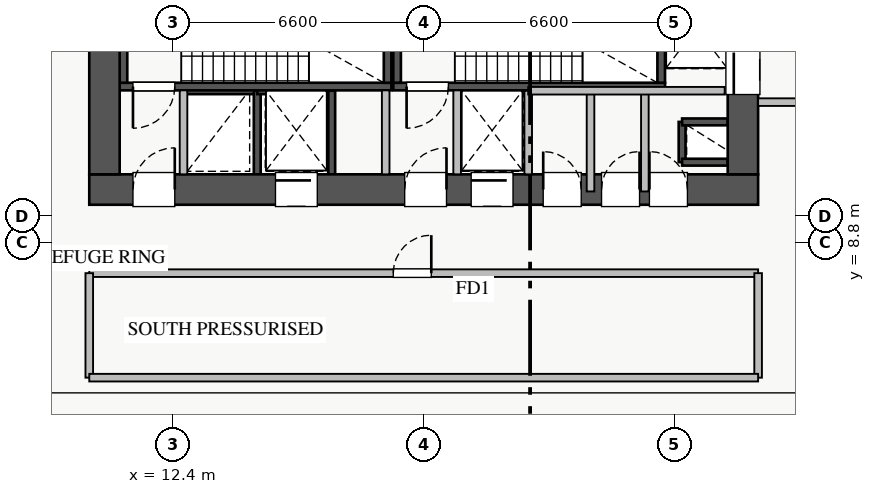
"""IFC4 building model, lengths in metres.
Left out: names, types, materials, properties, quantities, classifications, styles, units other than length and angle.
Written with IfcOpenShell. Run it as: python <this file> out.ifc"""

import sys

from ifc_helpers import new_model, si_unit, direction, frame, frame_2d, origin, place, context, subcontext, project, spatial, rectangle, extrude, source, transform, mapped, element, fill, save


model = new_model("IFC4")
c1 = context("Model", 3, precision=1e-05, world=origin(), true_north=direction((0.0, 1.0)))
c2 = subcontext(c1, "Body", "Model", "MODEL_VIEW")
j1 = project(units=[si_unit("LENGTHUNIT", "METRE"), si_unit("PLANEANGLEUNIT", "RADIAN")], contexts=[c1])
p1 = place(None, origin())
s1 = spatial("IfcSite", under=j1, at=p1, CompositionType="ELEMENT")
p2 = place(p1, origin())
s2 = spatial("IfcBuilding", under=s1, at=p2, CompositionType="ELEMENT")
p3 = place(p2, frame((0.0, 0.0, 45.75)))
s3 = spatial("IfcBuildingStorey", under=s2, at=p3, CompositionType="ELEMENT", Elevation=45.75)
p4 = place(p3, frame((12.68, 12.8, 0.0), z_axis=(0.0, 0.0, 1.0), x_axis=(1.0, 0.0, 0.0)))
e1 = element("IfcWall", 1, at=p4, inside=s3, PredefinedType="SHEAR", context=c2, shape_type="SweptSolid", body=[
    extrude(rectangle(XDim=1.94, YDim=0.18, at=frame_2d((0.97, 0.0))), origin(), (0.0, 0.0, 1.0), 4.32),
])
p5 = place(p3, frame((14.62, 10.6, 0.0), z_axis=(0.0, 0.0, 1.0), x_axis=(0.0, 1.0, 0.0)))
e2 = element("IfcWall", 2, at=p5, inside=s3, PredefinedType="SHEAR", context=c2, shape_type="SweptSolid", body=[
    extrude(rectangle(XDim=2.2, YDim=0.18, at=frame_2d((1.1, 0.0))), origin(), (0.0, 0.0, 1.0), 4.32),
])
p6 = place(p3, frame((25.8, 10.92, 0.0), z_axis=(0.0, 0.0, 1.0), x_axis=(0.0, 1.0, 0.0)))
e3 = element("IfcWall", 3, at=p6, inside=s3, PredefinedType="SHEAR", context=c2, shape_type="SweptSolid", body=[
    extrude(rectangle(XDim=1.06, YDim=0.18, at=frame_2d((0.53, 0.0))), origin(), (0.0, 0.0, 1.0), 4.32),
])
for number, where, z_axis, x_axis in (
    (4, (25.8, 11.98, 0.0), (0.0, 0.0, 1.0), (1.0, 0.0, 0.0)),
    (5, (25.8, 10.92, 0.0), (0.0, 0.0, 1.0), (1.0, 0.0, 0.0)),
):
    element("IfcWall", number, at=place(p3, frame(where, z_axis=z_axis, x_axis=x_axis)), inside=s3, PredefinedType="SHEAR", context=c2, shape_type="SweptSolid", body=[
        extrude(rectangle(XDim=1.2, YDim=0.18, at=frame_2d((0.6, 0.0))), origin(), (0.0, 0.0, 1.0), 4.32),
    ])
p7 = place(p3, frame((14.62, 12.8, 0.0), z_axis=(0.0, 0.0, 1.0), x_axis=(1.0, 0.0, 0.0)))
e6 = element("IfcWall", 6, at=p7, inside=s3, PredefinedType="SHEAR", context=c2, shape_type="SweptSolid", body=[
    extrude(rectangle(XDim=1.96, YDim=0.18, at=frame_2d((0.98, 0.0))), origin(), (0.0, 0.0, 1.0), 4.32),
])
p8 = place(p3, frame((16.58, 10.6, 0.0), z_axis=(0.0, 0.0, 1.0), x_axis=(0.0, 1.0, 0.0)))
e7 = element("IfcWall", 7, at=p8, inside=s3, PredefinedType="SHEAR", context=c2, shape_type="SweptSolid", body=[
    extrude(rectangle(XDim=2.2, YDim=0.18, at=frame_2d((1.1, 0.0))), origin(), (0.0, 0.0, 1.0), 4.32),
])
p9 = place(p3, frame((19.88, 12.8, 0.0), z_axis=(0.0, 0.0, 1.0), x_axis=(1.0, 0.0, 0.0)))
e8 = element("IfcWall", 8, at=p9, inside=s3, PredefinedType="SHEAR", context=c2, shape_type="SweptSolid", body=[
    extrude(rectangle(XDim=1.87, YDim=0.18, at=frame_2d((0.935, 0.0))), origin(), (0.0, 0.0, 1.0), 4.32),
])
p10 = place(p3, frame((11.0, 12.91, 0.0), z_axis=(0.0, 0.0, 1.0), x_axis=(1.0, 0.0, 0.0)))
e9 = element("IfcWall", 9, at=p10, inside=s3, PredefinedType="SHEAR", context=c2, shape_type="SweptSolid", body=[
    extrude(rectangle(XDim=7.15, YDim=0.2, at=frame_2d((3.575, 0.0))), origin(), (0.0, 0.0, 1.0), 4.5),
])
p11 = place(p10, frame((0.35, 0.0, 0.0)))
e10 = element("IfcOpeningElement", 10, at=p11, cuts=e9, PredefinedType="OPENING", context=c2, shape_type="SweptSolid", body=[
    extrude(rectangle(XDim=1.1, YDim=2.05, at=frame_2d((0.55, 1.025))), frame((0.0, 0.11, 0.0), z_axis=(0.0, -1.0, 0.0), x_axis=(1.0, 0.0, 0.0)), (0.0, 0.0, 1.0), 0.22),
])
for number, where, z_axis, x_axis in (
    (11, (11.1, 13.01, 0.0), (0.0, 0.0, 1.0), (0.0, 1.0, 0.0)),
    (12, (18.05, 13.01, 0.0), (0.0, 0.0, 1.0), (0.0, 1.0, 0.0)),
):
    element("IfcWall", number, at=place(p3, frame(where, z_axis=z_axis, x_axis=x_axis)), inside=s3, PredefinedType="SHEAR", context=c2, shape_type="SweptSolid", body=[
        extrude(rectangle(XDim=2.94, YDim=0.2, at=frame_2d((1.47, 0.0))), origin(), (0.0, 0.0, 1.0), 4.5),
    ])
p12 = place(p3, frame((18.2, 12.91, 0.0), z_axis=(0.0, 0.0, 1.0), x_axis=(1.0, 0.0, 0.0)))
e13 = element("IfcWall", 13, at=p12, inside=s3, PredefinedType="SHEAR", context=c2, shape_type="SweptSolid", body=[
    extrude(rectangle(XDim=7.15, YDim=0.2, at=frame_2d((3.575, 0.0))), origin(), (0.0, 0.0, 1.0), 4.5),
])
p13 = place(p12, frame((0.35, 0.0, 0.0)))
e14 = element("IfcOpeningElement", 14, at=p13, cuts=e13, PredefinedType="OPENING", context=c2, shape_type="SweptSolid", body=[
    extrude(rectangle(XDim=1.1, YDim=2.05, at=frame_2d((0.55, 1.025))), frame((0.0, 0.11, 0.0), z_axis=(0.0, -1.0, 0.0), x_axis=(1.0, 0.0, 0.0)), (0.0, 0.0, 1.0), 0.22),
])
for number, where, z_axis, x_axis in (
    (15, (18.3, 13.01, 0.0), (0.0, 0.0, 1.0), (0.0, 1.0, 0.0)),
    (16, (25.25, 13.01, 0.0), (0.0, 0.0, 1.0), (0.0, 1.0, 0.0)),
):
    element("IfcWall", number, at=place(p3, frame(where, z_axis=z_axis, x_axis=x_axis)), inside=s3, PredefinedType="SHEAR", context=c2, shape_type="SweptSolid", body=[
        extrude(rectangle(XDim=2.94, YDim=0.2, at=frame_2d((1.47, 0.0))), origin(), (0.0, 0.0, 1.0), 4.5),
    ])
p14 = place(p3, frame((10.2, 10.2, 0.0), z_axis=(0.0, 0.0, 1.0), x_axis=(1.0, 0.0, 0.0)))
e17 = element("IfcWall", 17, at=p14, inside=s3, PredefinedType="SHEAR", context=c2, shape_type="SweptSolid", body=[
    extrude(rectangle(XDim=17.6, YDim=0.8, at=frame_2d((8.8, 0.0))), origin(), (0.0, 0.0, 1.0), 4.5),
])
p15 = place(p14, frame((1.15, 0.0, 0.0)))
e18 = element("IfcOpeningElement", 18, at=p15, cuts=e17, PredefinedType="OPENING", context=c2, shape_type="SweptSolid", body=[
    extrude(rectangle(XDim=1.1, YDim=2.05, at=frame_2d((0.55, 1.025))), frame((0.0, 0.41, 0.0), z_axis=(0.0, -1.0, 0.0), x_axis=(1.0, 0.0, 0.0)), (0.0, 0.0, 1.0), 0.82),
])
p16 = place(p14, frame((8.3, 0.0, 0.0)))
e19 = element("IfcOpeningElement", 19, at=p16, cuts=e17, PredefinedType="OPENING", context=c2, shape_type="SweptSolid", body=[
    extrude(rectangle(XDim=1.1, YDim=2.05, at=frame_2d((0.55, 1.025))), frame((0.0, 0.41, 0.0), z_axis=(0.0, -1.0, 0.0), x_axis=(1.0, 0.0, 0.0)), (0.0, 0.0, 1.0), 0.82),
])
p17 = place(p14, frame((10.05, 0.0, 0.0)))
e20 = element("IfcOpeningElement", 20, at=p17, cuts=e17, PredefinedType="OPENING", context=c2, shape_type="SweptSolid", body=[
    extrude(rectangle(XDim=1.1, YDim=2.05, at=frame_2d((0.55, 1.025))), frame((0.0, 0.41, 0.0), z_axis=(0.0, -1.0, 0.0), x_axis=(1.0, 0.0, 0.0)), (0.0, 0.0, 1.0), 0.82),
])
p18 = place(p14, frame((4.9, 0.0, 0.0)))
e21 = element("IfcOpeningElement", 21, at=p18, cuts=e17, PredefinedType="OPENING", context=c2, shape_type="SweptSolid", body=[
    extrude(rectangle(XDim=1.1, YDim=2.05, at=frame_2d((0.55, 1.025))), frame((0.0, 0.41, 0.0), z_axis=(0.0, -1.0, 0.0), x_axis=(1.0, 0.0, 0.0)), (0.0, 0.0, 1.0), 0.82),
])
p19 = place(p14, frame((14.74, 0.0, 0.0)))
e22 = element("IfcOpeningElement", 22, at=p19, cuts=e17, PredefinedType="OPENING", context=c2, shape_type="SweptSolid", body=[
    extrude(rectangle(XDim=1.0, YDim=2.05, at=frame_2d((0.5, 1.025))), frame((0.0, 0.41, 0.0), z_axis=(0.0, -1.0, 0.0), x_axis=(1.0, 0.0, 0.0)), (0.0, 0.0, 1.0), 0.82),
])
p20 = place(p14, frame((11.945, 0.0, 0.0)))
e23 = element("IfcOpeningElement", 23, at=p20, cuts=e17, PredefinedType="OPENING", context=c2, shape_type="SweptSolid", body=[
    extrude(rectangle(XDim=1.0, YDim=2.05, at=frame_2d((0.5, 1.025))), frame((0.0, 0.41, 0.0), z_axis=(0.0, -1.0, 0.0), x_axis=(1.0, 0.0, 0.0)), (0.0, 0.0, 1.0), 0.82),
])
p21 = place(p14, frame((13.48, 0.0, 0.0)))
e24 = element("IfcOpeningElement", 24, at=p21, cuts=e17, PredefinedType="OPENING", context=c2, shape_type="SweptSolid", body=[
    extrude(rectangle(XDim=1.0, YDim=2.05, at=frame_2d((0.5, 1.025))), frame((0.0, 0.41, 0.0), z_axis=(0.0, -1.0, 0.0), x_axis=(1.0, 0.0, 0.0)), (0.0, 0.0, 1.0), 0.82),
])
p22 = place(p3, frame((10.6, 10.6, 0.0), z_axis=(0.0, 0.0, 1.0), x_axis=(0.0, 1.0, 0.0)))
e25 = element("IfcWall", 25, at=p22, inside=s3, PredefinedType="SHEAR", context=c2, shape_type="SweptSolid", body=[
    extrude(rectangle(XDim=5.6, YDim=0.8, at=frame_2d((2.8, 0.0))), origin(), (0.0, 0.0, 1.0), 4.5),
])
p23 = place(p3, frame((27.4, 10.6, 0.0), z_axis=(0.0, 0.0, 1.0), x_axis=(0.0, 1.0, 0.0)))
e26 = element("IfcWall", 26, at=p23, inside=s3, PredefinedType="SHEAR", context=c2, shape_type="SweptSolid", body=[
    extrude(rectangle(XDim=5.6, YDim=0.8, at=frame_2d((2.8, 0.0))), origin(), (0.0, 0.0, 1.0), 4.5),
])
p24 = place(p23, frame((2.1, 0.0, 0.0)))
e27 = element("IfcOpeningElement", 27, at=p24, cuts=e26, PredefinedType="OPENING", context=c2, shape_type="SweptSolid", body=[
    extrude(rectangle(XDim=1.3, YDim=2.05, at=frame_2d((0.65, 1.025))), frame((0.0, 0.41, 0.0), z_axis=(0.0, -1.0, 0.0), x_axis=(1.0, 0.0, 0.0)), (0.0, 0.0, 1.0), 0.82),
])
p25 = place(p3, frame((27.8, 12.5, 0.0), z_axis=(0.0, 0.0, 1.0), x_axis=(1.0, 0.0, 0.0)))
e28 = element("IfcWall", 28, at=p25, inside=s3, PredefinedType="PARTITIONING", context=c2, shape_type="SweptSolid", body=[
    extrude(rectangle(XDim=3.1, YDim=0.2, at=frame_2d((1.55, 0.0))), origin(), (0.0, 0.0, 1.0), 4.32),
])
for number, where, z_axis, x_axis in (
    (29, (12.68, 10.6, 0.0), (0.0, 0.0, 1.0), (0.0, 1.0, 0.0)),
    (30, (18.0, 10.6, 0.0), (0.0, 0.0, 1.0), (0.0, 1.0, 0.0)),
    (31, (19.88, 10.6, 0.0), (0.0, 0.0, 1.0), (0.0, 1.0, 0.0)),
):
    element("IfcWall", number, at=place(p3, frame(where, z_axis=z_axis, x_axis=x_axis)), inside=s3, PredefinedType="PARTITIONING", context=c2, shape_type="SweptSolid", body=[
        extrude(rectangle(XDim=2.21, YDim=0.2, at=frame_2d((1.105, 0.0))), origin(), (0.0, 0.0, 1.0), 4.32),
    ])
p26 = place(p3, frame((24.82, 10.15, 0.0), z_axis=(0.0, 0.0, 1.0), x_axis=(0.0, 1.0, 0.0)))
e32 = element("IfcWall", 32, at=p26, inside=s3, PredefinedType="PARTITIONING", context=c2, shape_type="SweptSolid", body=[
    extrude(rectangle(XDim=2.65, YDim=0.2, at=frame_2d((1.325, 0.0))), origin(), (0.0, 0.0, 1.0), 4.32),
])
p27 = place(p3, frame((21.75, 10.6, 0.0), z_axis=(0.0, 0.0, 1.0), x_axis=(0.0, 1.0, 0.0)))
e33 = element("IfcWall", 33, at=p27, inside=s3, PredefinedType="PARTITIONING", context=c2, shape_type="SweptSolid", body=[
    extrude(rectangle(XDim=2.2, YDim=0.2, at=frame_2d((1.1, 0.0))), origin(), (0.0, 0.0, 1.0), 4.32),
])
p28 = place(p3, frame((23.39, 10.15, 0.0), z_axis=(0.0, 0.0, 1.0), x_axis=(0.0, 1.0, 0.0)))
e34 = element("IfcWall", 34, at=p28, inside=s3, PredefinedType="PARTITIONING", context=c2, shape_type="SweptSolid", body=[
    extrude(rectangle(XDim=2.65, YDim=0.2, at=frame_2d((1.325, 0.0))), origin(), (0.0, 0.0, 1.0), 4.32),
])
p29 = place(p3, frame((21.75, 12.8, 0.0), z_axis=(0.0, 0.0, 1.0), x_axis=(1.0, 0.0, 0.0)))
e35 = element("IfcWall", 35, at=p29, inside=s3, PredefinedType="PARTITIONING", context=c2, shape_type="SweptSolid", body=[
    extrude(rectangle(XDim=5.17, YDim=0.2, at=frame_2d((2.585, 0.0))), origin(), (0.0, 0.0, 1.0), 4.32),
])
p30 = place(p3, frame((10.2, 8.0, 0.0), z_axis=(0.0, 0.0, 1.0), x_axis=(1.0, 0.0, 0.0)))
e36 = element("IfcWall", 36, at=p30, inside=s3, PredefinedType="PARTITIONING", context=c2, shape_type="SweptSolid", body=[
    extrude(rectangle(XDim=17.6, YDim=0.2, at=frame_2d((8.8, 0.0))), origin(), (0.0, 0.0, 1.0), 4.32),
])
p31 = place(p30, frame((8.0, 0.0, 0.0)))
e37 = element("IfcOpeningElement", 37, at=p31, cuts=e36, PredefinedType="OPENING", context=c2, shape_type="SweptSolid", body=[
    extrude(rectangle(XDim=1.0, YDim=2.05, at=frame_2d((0.5, 1.025))), frame((0.0, 0.11, 0.0), z_axis=(0.0, -1.0, 0.0), x_axis=(1.0, 0.0, 0.0)), (0.0, 0.0, 1.0), 0.22),
])
for number, where, z_axis, x_axis in (
    (38, (10.2, 5.25, 0.0), (0.0, 0.0, 1.0), (0.0, 1.0, 0.0)),
    (39, (27.8, 5.25, 0.0), (0.0, 0.0, 1.0), (0.0, 1.0, 0.0)),
):
    element("IfcWall", number, at=place(p3, frame(where, z_axis=z_axis, x_axis=x_axis)), inside=s3, PredefinedType="PARTITIONING", context=c2, shape_type="SweptSolid", body=[
        extrude(rectangle(XDim=2.75, YDim=0.2, at=frame_2d((1.375, 0.0))), origin(), (0.0, 0.0, 1.0), 4.32),
    ])
p32 = place(p3, frame((10.2, 5.25, 0.0), z_axis=(0.0, 0.0, 1.0), x_axis=(1.0, 0.0, 0.0)))
e40 = element("IfcWall", 40, at=p32, inside=s3, PredefinedType="PARTITIONING", context=c2, shape_type="SweptSolid", body=[
    extrude(rectangle(XDim=17.6, YDim=0.2, at=frame_2d((8.8, 0.0))), origin(), (0.0, 0.0, 1.0), 4.32),
])
m1 = source(origin(), c2, "Body", "SweptSolid", [
    extrude(rectangle(XDim=1.3, YDim=2.05, at=frame_2d((0.65, 1.025))), frame((0.0, 0.025, 0.0), z_axis=(0.0, -1.0, 0.0), x_axis=(1.0, 0.0, 0.0)), (0.0, 0.0, 1.0), 0.05),
])
p33 = place(p24, origin())
e41 = element("IfcDoor", 41, at=p33, inside=s3, OperationType="SLIDING_TO_RIGHT", PredefinedType="DOOR", context=c2, shape_type="MappedRepresentation", body=[
    mapped(m1, transform((0.0, 0.0, 0.0), x_axis=(1.0, 0.0, 0.0), y_axis=(0.0, 1.0, 0.0), z_axis=(0.0, 0.0, 1.0), scale=1.0)),
])
fill(e27, e41)
m2 = source(origin(), c2, "Body", "SweptSolid", [
    extrude(rectangle(XDim=1.1, YDim=2.05, at=frame_2d((0.55, 1.025))), frame((0.0, 0.025, 0.0), z_axis=(0.0, -1.0, 0.0), x_axis=(1.0, 0.0, 0.0)), (0.0, 0.0, 1.0), 0.05),
])
p34 = place(p15, origin())
e42 = element("IfcDoor", 42, at=p34, inside=s3, OperationType="SINGLE_SWING_RIGHT", PredefinedType="DOOR", context=c2, shape_type="MappedRepresentation", body=[
    mapped(m2, transform((0.0, 0.0, 0.0), x_axis=(1.0, 0.0, 0.0), y_axis=(0.0, 1.0, 0.0), z_axis=(0.0, 0.0, 1.0), scale=1.0)),
])
fill(e18, e42)
p35 = place(p11, frame((1.1, 0.0, 0.0), z_axis=(0.0, 0.0, 1.0), x_axis=(-1.0, 0.0, 0.0)))
e43 = element("IfcDoor", 43, at=p35, inside=s3, OperationType="SINGLE_SWING_LEFT", PredefinedType="DOOR", context=c2, shape_type="MappedRepresentation", body=[
    mapped(m2, transform((0.0, 0.0, 0.0), x_axis=(1.0, 0.0, 0.0), y_axis=(0.0, 1.0, 0.0), z_axis=(0.0, 0.0, 1.0), scale=1.0)),
])
fill(e10, e43)
p36 = place(p16, origin())
e44 = element("IfcDoor", 44, at=p36, inside=s3, OperationType="SINGLE_SWING_RIGHT", PredefinedType="DOOR", context=c2, shape_type="MappedRepresentation", body=[
    mapped(m2, transform((0.0, 0.0, 0.0), x_axis=(1.0, 0.0, 0.0), y_axis=(0.0, 1.0, 0.0), z_axis=(0.0, 0.0, 1.0), scale=1.0)),
])
fill(e19, e44)
p37 = place(p13, frame((1.1, 0.0, 0.0), z_axis=(0.0, 0.0, 1.0), x_axis=(-1.0, 0.0, 0.0)))
e45 = element("IfcDoor", 45, at=p37, inside=s3, OperationType="SINGLE_SWING_LEFT", PredefinedType="DOOR", context=c2, shape_type="MappedRepresentation", body=[
    mapped(m2, transform((0.0, 0.0, 0.0), x_axis=(1.0, 0.0, 0.0), y_axis=(0.0, 1.0, 0.0), z_axis=(0.0, 0.0, 1.0), scale=1.0)),
])
fill(e14, e45)
p38 = place(p17, origin())
e46 = element("IfcDoor", 46, at=p38, inside=s3, OperationType="SLIDING_TO_RIGHT", PredefinedType="DOOR", context=c2, shape_type="MappedRepresentation", body=[
    mapped(m2, transform((0.0, 0.0, 0.0), x_axis=(1.0, 0.0, 0.0), y_axis=(0.0, 1.0, 0.0), z_axis=(0.0, 0.0, 1.0), scale=1.0)),
])
fill(e20, e46)
p39 = place(p18, origin())
e47 = element("IfcDoor", 47, at=p39, inside=s3, OperationType="SLIDING_TO_RIGHT", PredefinedType="DOOR", context=c2, shape_type="MappedRepresentation", body=[
    mapped(m2, transform((0.0, 0.0, 0.0), x_axis=(1.0, 0.0, 0.0), y_axis=(0.0, 1.0, 0.0), z_axis=(0.0, 0.0, 1.0), scale=1.0)),
])
fill(e21, e47)
m3 = source(origin(), c2, "Body", "SweptSolid", [
    extrude(rectangle(XDim=1.0, YDim=2.05, at=frame_2d((0.5, 1.025))), frame((0.0, 0.025, 0.0), z_axis=(0.0, -1.0, 0.0), x_axis=(1.0, 0.0, 0.0)), (0.0, 0.0, 1.0), 0.05),
])
p40 = place(p19, origin())
e48 = element("IfcDoor", 48, at=p40, inside=s3, OperationType="SINGLE_SWING_LEFT", PredefinedType="DOOR", context=c2, shape_type="MappedRepresentation", body=[
    mapped(m3, transform((0.0, 0.0, 0.0), x_axis=(1.0, 0.0, 0.0), y_axis=(0.0, 1.0, 0.0), z_axis=(0.0, 0.0, 1.0), scale=1.0)),
])
fill(e22, e48)
p41 = place(p20, origin())
e49 = element("IfcDoor", 49, at=p41, inside=s3, OperationType="SINGLE_SWING_LEFT", PredefinedType="DOOR", context=c2, shape_type="MappedRepresentation", body=[
    mapped(m3, transform((0.0, 0.0, 0.0), x_axis=(1.0, 0.0, 0.0), y_axis=(0.0, 1.0, 0.0), z_axis=(0.0, 0.0, 1.0), scale=1.0)),
])
fill(e23, e49)
p42 = place(p21, origin())
e50 = element("IfcDoor", 50, at=p42, inside=s3, OperationType="SINGLE_SWING_RIGHT", PredefinedType="DOOR", context=c2, shape_type="MappedRepresentation", body=[
    mapped(m3, transform((0.0, 0.0, 0.0), x_axis=(1.0, 0.0, 0.0), y_axis=(0.0, 1.0, 0.0), z_axis=(0.0, 0.0, 1.0), scale=1.0)),
])
fill(e24, e50)
p43 = place(p31, origin())
e51 = element("IfcDoor", 51, at=p43, inside=s3, OperationType="SINGLE_SWING_RIGHT", PredefinedType="DOOR", context=c2, shape_type="MappedRepresentation", body=[
    mapped(m3, transform((0.0, 0.0, 0.0), x_axis=(1.0, 0.0, 0.0), y_axis=(0.0, 1.0, 0.0), z_axis=(0.0, 0.0, 1.0), scale=1.0)),
])
fill(e37, e51)
save(model, sys.argv[1])
